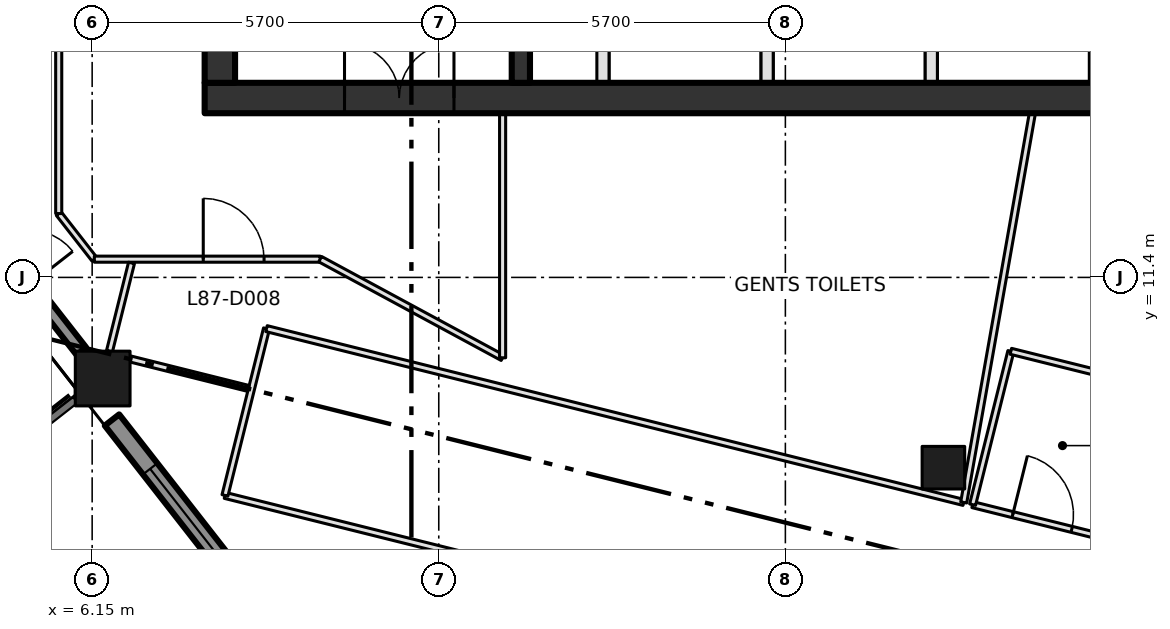
"""IFC4 building model, lengths in metres.
Left out: names, types, materials, properties, quantities, classifications, styles, units other than length and angle.
Written with IfcOpenShell. Run it as: python <this file> out.ifc"""

import sys

from ifc_helpers import new_model, si_unit, direction, frame, frame_2d, origin, origin_2d, place, context, subcontext, project, spatial, rectangle, extrude, element, fill, save


model = new_model("IFC4")
c1 = context("Model", 3, precision=1e-05, world=origin(), true_north=direction((0.0, 1.0)))
c2 = subcontext(c1, "Body", "Model", "MODEL_VIEW")
j1 = project(units=[si_unit("LENGTHUNIT", "METRE"), si_unit("PLANEANGLEUNIT", "RADIAN")], contexts=[c1])
p1 = place(None, origin())
s1 = spatial("IfcSite", under=j1, at=p1, CompositionType="ELEMENT")
p2 = place(p1, origin())
s2 = spatial("IfcBuilding", under=s1, at=p2, CompositionType="ELEMENT")
p3 = place(p2, frame((0.0, 0.0, 379.2)))
s3 = spatial("IfcBuildingStorey", under=s2, at=p3, CompositionType="ELEMENT", Elevation=379.2)
p4 = place(p3, frame((6.323, 9.737, 0.0), z_axis=(0.0, 0.0, 1.0), x_axis=(1.0, 0.0, 0.0)))
e1 = element("IfcColumn", 1, at=p4, inside=s3, PredefinedType="COLUMN", context=c2, shape_type="SweptSolid", body=[
    extrude(rectangle(XDim=0.9, YDim=0.9, at=origin_2d()), origin(), (0.0, 0.0, 1.0), 4.2),
])
p5 = place(p3, frame((20.149, 8.271, 0.0), z_axis=(0.0, 0.0, 1.0), x_axis=(1.0, 0.0, 0.0)))
e2 = element("IfcColumn", 2, at=p5, inside=s3, PredefinedType="COLUMN", context=c2, shape_type="SweptSolid", body=[
    extrude(rectangle(XDim=0.7, YDim=0.7, at=origin_2d()), origin(), (0.0, 0.0, 1.0), 4.2),
])
p6 = place(p3, frame((8.0, 14.35, -0.3), z_axis=(0.0, 0.0, 1.0), x_axis=(1.0, 0.0, 0.0)))
e3 = element("IfcWall", 3, at=p6, inside=s3, PredefinedType="SHEAR", context=c2, shape_type="SweptSolid", body=[
    extrude(rectangle(XDim=22.8, YDim=0.5, at=frame_2d((11.4, 0.0))), origin(), (0.0, 0.0, 1.0), 4.2),
])
p7 = place(p6, frame((2.3, 0.0, 0.3)))
e4 = element("IfcOpeningElement", 4, at=p7, cuts=e3, PredefinedType="OPENING", context=c2, shape_type="SweptSolid", body=[
    extrude(rectangle(XDim=1.8, YDim=2.1, at=frame_2d((0.9, 1.05))), frame((0.0, 0.26, 0.0), z_axis=(0.0, -1.0, 0.0), x_axis=(1.0, 0.0, 0.0)), (0.0, 0.0, 1.0), 0.52),
])
p8 = place(p3, frame((8.25, 14.6, -0.3), z_axis=(0.0, 0.0, 1.0), x_axis=(0.0, 1.0, 0.0)))
e5 = element("IfcWall", 5, at=p8, inside=s3, PredefinedType="SHEAR", context=c2, shape_type="SweptSolid", body=[
    extrude(rectangle(XDim=21.1, YDim=0.5, at=frame_2d((10.55, 0.0))), origin(), (0.0, 0.0, 1.0), 4.2),
])
p9 = place(p3, frame((13.2, 14.6, 0.0), z_axis=(0.0, 0.0, 1.0), x_axis=(0.0, 1.0, 0.0)))
e6 = element("IfcWall", 6, at=p9, inside=s3, PredefinedType="SHEAR", context=c2, shape_type="SweptSolid", body=[
    extrude(rectangle(XDim=21.1, YDim=0.3, at=frame_2d((10.55, 0.0))), origin(), (0.0, 0.0, 1.0), 3.9),
])
p10 = place(p9, frame((3.7, 0.0, 0.0)))
e7 = element("IfcOpeningElement", 7, at=p10, cuts=e6, PredefinedType="OPENING", context=c2, shape_type="SweptSolid", body=[
    extrude(rectangle(XDim=1.8, YDim=2.1, at=frame_2d((0.9, 1.05))), frame((0.0, 0.16, 0.0), z_axis=(0.0, -1.0, 0.0), x_axis=(1.0, 0.0, 0.0)), (0.0, 0.0, 1.0), 0.32),
])
p11 = place(p9, frame((11.8, 0.0, 0.0)))
e8 = element("IfcOpeningElement", 8, at=p11, cuts=e6, PredefinedType="OPENING", context=c2, shape_type="SweptSolid", body=[
    extrude(rectangle(XDim=1.2, YDim=2.1, at=frame_2d((0.6, 1.05))), frame((0.0, 0.16, 0.0), z_axis=(0.0, -1.0, 0.0), x_axis=(1.0, 0.0, 0.0)), (0.0, 0.0, 1.0), 0.32),
])
for number, where, z_axis, x_axis in (
    (9, (14.55, 14.6, 0.0), (0.0, 0.0, 1.0), (0.0, 1.0, 0.0)),
    (10, (17.25, 14.6, 0.0), (0.0, 0.0, 1.0), (0.0, 1.0, 0.0)),
    (11, (19.95, 14.6, 0.0), (0.0, 0.0, 1.0), (0.0, 1.0, 0.0)),
    (12, (22.65, 14.6, 0.0), (0.0, 0.0, 1.0), (0.0, 1.0, 0.0)),
):
    element("IfcWall", number, at=place(p3, frame(where, z_axis=z_axis, x_axis=x_axis)), inside=s3, PredefinedType="SOLIDWALL", context=c2, shape_type="SweptSolid", body=[
        extrude(rectangle(XDim=3.0, YDim=0.2, at=frame_2d((1.5, 0.0))), origin(), (0.0, 0.0, 1.0), 3.9),
    ])
p12 = place(p3, frame((3.166, 13.779, 0.0), z_axis=(0.0, 0.0, 1.0), x_axis=(0.615593109271, -0.788064162247, 0.0)))
e13 = element("IfcWall", 13, at=p12, inside=s3, PredefinedType="SOLIDWALL", context=c2, shape_type="SweptSolid", body=[
    extrude(rectangle(XDim=4.558, YDim=0.2, at=frame_2d((2.279, 0.0))), origin(), (0.0, 0.0, 1.0), 3.2),
])
p13 = place(p12, frame((1.378, 0.0, 0.0)))
e14 = element("IfcOpeningElement", 14, at=p13, cuts=e13, PredefinedType="OPENING", context=c2, shape_type="SweptSolid", body=[
    extrude(rectangle(XDim=1.8, YDim=2.9, at=frame_2d((0.9, 1.45))), frame((0.0, 0.11, 0.0), z_axis=(0.0, -1.0, 0.0), x_axis=(1.0, 0.0, 0.0)), (0.0, 0.0, 1.0), 0.22),
])
p14 = place(p3, frame((6.476, 9.055, 0.0), z_axis=(0.0, 0.0, 1.0), x_axis=(0.615649380255, -0.788020203162, 0.0)))
e15 = element("IfcWall", 15, at=p14, inside=s3, PredefinedType="SOLIDWALL", context=c2, shape_type="SweptSolid", body=[
    extrude(rectangle(XDim=4.438, YDim=0.3, at=frame_2d((2.219, 0.0))), origin(), (0.0, 0.0, 1.0), 3.2),
])
p15 = place(p14, frame((1.019, 0.0, 0.8)))
e16 = element("IfcOpeningElement", 16, at=p15, cuts=e15, PredefinedType="OPENING", context=c2, shape_type="SweptSolid", body=[
    extrude(rectangle(XDim=2.4, YDim=2.1, at=frame_2d((1.2, 1.05))), frame((0.0, 0.16, 0.0), z_axis=(0.0, -1.0, 0.0), x_axis=(1.0, 0.0, 0.0)), (0.0, 0.0, 1.0), 0.32),
])
p16 = place(p3, frame((5.6, 12.45, 0.0), z_axis=(0.0, 0.0, 1.0), x_axis=(0.615644041972, -0.788024373725, 0.0)))
e17 = element("IfcWall", 17, at=p16, inside=s3, PredefinedType="PARTITIONING", context=c2, shape_type="SweptSolid", body=[
    extrude(rectangle(XDim=0.952, YDim=0.1, at=frame_2d((0.476, 0.0))), origin(), (0.0, 0.0, 1.0), 3.9),
])
p17 = place(p3, frame((5.6, 39.3, 0.0), z_axis=(0.0, 0.0, 1.0), x_axis=(0.0, -1.0, 0.0)))
e18 = element("IfcWall", 18, at=p17, inside=s3, PredefinedType="PARTITIONING", context=c2, shape_type="SweptSolid", body=[
    extrude(rectangle(XDim=26.85, YDim=0.1, at=frame_2d((13.425, 0.0))), origin(), (0.0, 0.0, 1.0), 3.9),
])
p18 = place(p17, frame((21.425, 0.0, 0.0)))
e19 = element("IfcOpeningElement", 19, at=p18, cuts=e18, PredefinedType="OPENING", context=c2, shape_type="SweptSolid", body=[
    extrude(rectangle(XDim=1.0, YDim=2.1, at=frame_2d((0.5, 1.05))), frame((0.0, 0.06, 0.0), z_axis=(0.0, -1.0, 0.0), x_axis=(1.0, 0.0, 0.0)), (0.0, 0.0, 1.0), 0.12),
])
p19 = place(p17, frame((9.825, 0.0, 0.0)))
e20 = element("IfcOpeningElement", 20, at=p19, cuts=e18, PredefinedType="OPENING", context=c2, shape_type="SweptSolid", body=[
    extrude(rectangle(XDim=1.0, YDim=2.1, at=frame_2d((0.5, 1.05))), frame((0.0, 0.06, 0.0), z_axis=(0.0, -1.0, 0.0), x_axis=(1.0, 0.0, 0.0)), (0.0, 0.0, 1.0), 0.12),
])
p20 = place(p3, frame((6.186, 11.7, 0.0), z_axis=(0.0, 0.0, 1.0), x_axis=(1.0, 0.0, 0.0)))
e21 = element("IfcWall", 21, at=p20, inside=s3, PredefinedType="PARTITIONING", context=c2, shape_type="SweptSolid", body=[
    extrude(rectangle(XDim=3.714, YDim=0.1, at=frame_2d((1.857, 0.0))), origin(), (0.0, 0.0, 1.0), 3.9),
])
p21 = place(p20, frame((1.791, 0.0, 0.0)))
e22 = element("IfcOpeningElement", 22, at=p21, cuts=e21, PredefinedType="OPENING", context=c2, shape_type="SweptSolid", body=[
    extrude(rectangle(XDim=1.0, YDim=2.1, at=frame_2d((0.5, 1.05))), frame((0.0, 0.06, 0.0), z_axis=(0.0, -1.0, 0.0), x_axis=(1.0, 0.0, 0.0)), (0.0, 0.0, 1.0), 0.12),
])
p22 = place(p3, frame((8.334, 7.815, 0.0), z_axis=(0.0, 0.0, 1.0), x_axis=(0.970312231044, -0.241855688968, 0.0)))
e23 = element("IfcWall", 23, at=p22, inside=s3, PredefinedType="PARTITIONING", context=c2, shape_type="SweptSolid", body=[
    extrude(rectangle(XDim=11.069, YDim=0.1, at=frame_2d((5.534, 0.0))), origin(), (0.0, 0.0, 1.0), 3.9),
])
p23 = place(p3, frame((9.017, 10.558, 0.0), z_axis=(0.0, 0.0, 1.0), x_axis=(-0.241641419317, -0.970365613813, 0.0)))
e24 = element("IfcWall", 24, at=p23, inside=s3, PredefinedType="PARTITIONING", context=c2, shape_type="SweptSolid", body=[
    extrude(rectangle(XDim=2.827, YDim=0.1, at=frame_2d((1.414, 0.0))), origin(), (0.0, 0.0, 1.0), 3.9),
])
p24 = place(p3, frame((9.9, 11.7, 0.0), z_axis=(0.0, 0.0, 1.0), x_axis=(0.87965147249, -0.475618846291, 0.0)))
e25 = element("IfcWall", 25, at=p24, inside=s3, PredefinedType="PARTITIONING", context=c2, shape_type="SweptSolid", body=[
    extrude(rectangle(XDim=3.41, YDim=0.1, at=frame_2d((1.705, 0.0))), origin(), (0.0, 0.0, 1.0), 3.9),
])
p25 = place(p3, frame((12.9, 10.078, 0.0), z_axis=(0.0, 0.0, 1.0), x_axis=(0.0, 1.0, 0.0)))
e26 = element("IfcWall", 26, at=p25, inside=s3, PredefinedType="PARTITIONING", context=c2, shape_type="SweptSolid", body=[
    extrude(rectangle(XDim=4.022, YDim=0.1, at=frame_2d((2.011, 0.0))), origin(), (0.0, 0.0, 1.0), 3.9),
])
p26 = place(p3, frame((20.483, 7.699, 0.0), z_axis=(0.0, 0.0, 1.0), x_axis=(-0.970288161847, 0.241952232846, 0.0)))
e27 = element("IfcWall", 27, at=p26, inside=s3, PredefinedType="PARTITIONING", context=c2, shape_type="SweptSolid", body=[
    extrude(rectangle(XDim=11.817, YDim=0.1, at=frame_2d((5.908, 0.0))), origin(), (0.0, 0.0, 1.0), 3.9),
])
p27 = place(p3, frame((20.629, 7.663, 0.0), z_axis=(0.0, 0.0, 1.0), x_axis=(0.970296588572, -0.241918437093, 0.0)))
e28 = element("IfcWall", 28, at=p27, inside=s3, PredefinedType="PARTITIONING", context=c2, shape_type="SweptSolid", body=[
    extrude(rectangle(XDim=7.912, YDim=0.1, at=frame_2d((3.956, 0.0))), origin(), (0.0, 0.0, 1.0), 3.9),
])
p28 = place(p27, frame((0.68, 0.0, 0.0)))
e29 = element("IfcOpeningElement", 29, at=p28, cuts=e28, PredefinedType="OPENING", context=c2, shape_type="SweptSolid", body=[
    extrude(rectangle(XDim=1.0, YDim=2.1, at=frame_2d((0.5, 1.05))), frame((0.0, 0.06, 0.0), z_axis=(0.0, -1.0, 0.0), x_axis=(1.0, 0.0, 0.0)), (0.0, 0.0, 1.0), 0.12),
])
p29 = place(p3, frame((6.797, 11.638, 0.0), z_axis=(0.0, 0.0, 1.0), x_axis=(-0.242113049408, -0.970248046278, 0.0)))
e30 = element("IfcWall", 30, at=p29, inside=s3, PredefinedType="PARTITIONING", context=c2, shape_type="SweptSolid", body=[
    extrude(rectangle(XDim=1.495, YDim=0.1, at=frame_2d((0.748, 0.0))), origin(), (0.0, 0.0, 1.0), 3.9),
])
p30 = place(p3, frame((8.72, 9.574, 0.0), z_axis=(0.0, 0.0, 1.0), x_axis=(-0.970221168815, 0.24222073318, 0.0)))
e31 = element("IfcWall", 31, at=p30, inside=s3, PredefinedType="PARTITIONING", context=c2, shape_type="SweptSolid", body=[
    extrude(rectangle(XDim=2.007, YDim=0.1, at=frame_2d((1.003, 0.0))), origin(), (0.0, 0.0, 1.0), 3.9),
])
p31 = place(p3, frame((20.483, 7.699, 0.0), z_axis=(0.0, 0.0, 1.0), x_axis=(0.173716766884, 0.98479565642, 0.0)))
e32 = element("IfcWall", 32, at=p31, inside=s3, PredefinedType="PARTITIONING", context=c2, shape_type="SweptSolid", body=[
    extrude(rectangle(XDim=6.5, YDim=0.1, at=frame_2d((3.25, 0.0))), origin(), (0.0, 0.0, 1.0), 3.9),
])
p32 = place(p3, frame((20.629, 7.663, 0.0), z_axis=(0.0, 0.0, 1.0), x_axis=(0.242049385216, 0.970263930648, 0.0)))
e33 = element("IfcWall", 33, at=p32, inside=s3, PredefinedType="PARTITIONING", context=c2, shape_type="SweptSolid", body=[
    extrude(rectangle(XDim=2.599, YDim=0.1, at=frame_2d((1.3, 0.0))), origin(), (0.0, 0.0, 1.0), 3.9),
])
p33 = place(p3, frame((21.258, 10.185, 0.0), z_axis=(0.0, 0.0, 1.0), x_axis=(0.970327787359, -0.241793269299, 0.0)))
e34 = element("IfcWall", 34, at=p33, inside=s3, PredefinedType="PARTITIONING", context=c2, shape_type="SweptSolid", body=[
    extrude(rectangle(XDim=2.399, YDim=0.1, at=frame_2d((1.2, 0.0))), origin(), (0.0, 0.0, 1.0), 3.9),
])
p34 = place(p7, origin())
e35 = element("IfcDoor", 35, at=p34, inside=s3, OperationType="DOUBLE_DOOR_SINGLE_SWING", PredefinedType="DOOR", context=c2, shape_type="SweptSolid", body=[
    extrude(rectangle(XDim=1.8, YDim=2.1, at=frame_2d((0.9, 1.05))), frame((0.0, 0.025, 0.0), z_axis=(0.0, -1.0, 0.0), x_axis=(1.0, 0.0, 0.0)), (0.0, 0.0, 1.0), 0.05),
])
fill(e4, e35)
p35 = place(p15, origin())
e36 = element("IfcWindow", 36, at=p35, inside=s3, PartitioningType="DOUBLE_PANEL_VERTICAL", PredefinedType="WINDOW", context=c2, shape_type="SweptSolid", body=[
    extrude(rectangle(XDim=2.4, YDim=2.1, at=frame_2d((1.2, 1.05))), frame((0.0, 0.03, 0.0), z_axis=(0.0, -1.0, 0.0), x_axis=(1.0, 0.0, 0.0)), (0.0, 0.0, 1.0), 0.06),
])
fill(e16, e36)
p36 = place(p21, origin())
e37 = element("IfcDoor", 37, at=p36, inside=s3, OperationType="SINGLE_SWING_LEFT", PredefinedType="DOOR", context=c2, shape_type="SweptSolid", body=[
    extrude(rectangle(XDim=1.0, YDim=2.1, at=frame_2d((0.5, 1.05))), frame((0.0, 0.025, 0.0), z_axis=(0.0, -1.0, 0.0), x_axis=(1.0, 0.0, 0.0)), (0.0, 0.0, 1.0), 0.05),
])
fill(e22, e37)
p37 = place(p28, origin())
e38 = element("IfcDoor", 38, at=p37, inside=s3, OperationType="SINGLE_SWING_LEFT", PredefinedType="DOOR", context=c2, shape_type="SweptSolid", body=[
    extrude(rectangle(XDim=1.0, YDim=2.1, at=frame_2d((0.5, 1.05))), frame((0.0, 0.025, 0.0), z_axis=(0.0, -1.0, 0.0), x_axis=(1.0, 0.0, 0.0)), (0.0, 0.0, 1.0), 0.05),
])
fill(e29, e38)
save(model, sys.argv[1])
